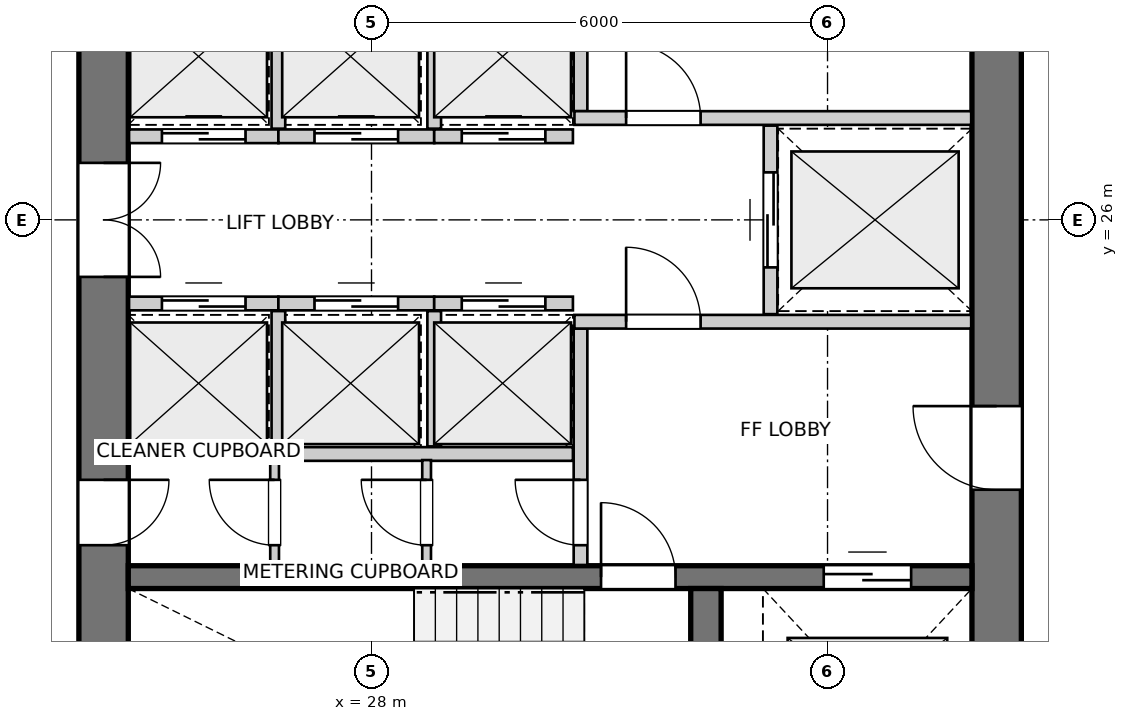
"""IFC4 building model, lengths in metres.
Left out: names, types, materials, properties, quantities, classifications, styles, units other than length and angle.
Written with IfcOpenShell. Run it as: python <this file> out.ifc"""

import sys

from ifc_helpers import new_model, si_unit, direction, frame, frame_2d, origin, place, context, subcontext, project, spatial, rectangle, extrude, source, transform, mapped, element, fill, save


model = new_model("IFC4")
c1 = context("Model", 3, precision=1e-05, world=origin(), true_north=direction((0.0, 1.0)))
c2 = subcontext(c1, "Body", "Model", "MODEL_VIEW")
j1 = project(units=[si_unit("LENGTHUNIT", "METRE"), si_unit("PLANEANGLEUNIT", "RADIAN")], contexts=[c1])
p1 = place(None, origin())
s1 = spatial("IfcSite", under=j1, at=p1, CompositionType="ELEMENT")
p2 = place(p1, origin())
s2 = spatial("IfcBuilding", under=s1, at=p2, CompositionType="ELEMENT")
p3 = place(p2, frame((0.0, 0.0, 124.8)))
s3 = spatial("IfcBuildingStorey", under=s2, at=p3, CompositionType="ELEMENT", Elevation=124.8)
p4 = place(p3, frame((24.475, 33.8, 0.0), z_axis=(0.0, 0.0, 1.0), x_axis=(0.0, -1.0, 0.0)))
e1 = element("IfcWall", 1, at=p4, inside=s3, PredefinedType="SHEAR", context=c2, shape_type="SweptSolid", body=[
    extrude(rectangle(XDim=15.6, YDim=0.65, at=frame_2d((7.8, 0.0))), origin(), (0.0, 0.0, 1.0), 2.9),
])
p5 = place(p4, frame((7.05, 0.0, 0.0)))
e2 = element("IfcOpeningElement", 2, at=p5, cuts=e1, PredefinedType="OPENING", context=c2, shape_type="SweptSolid", body=[
    extrude(rectangle(XDim=1.5, YDim=2.15, at=frame_2d((0.75, 1.075))), frame((0.0, 0.335, 0.0), z_axis=(0.0, -1.0, 0.0), x_axis=(1.0, 0.0, 0.0)), (0.0, 0.0, 1.0), 0.67),
])
p6 = place(p4, frame((3.52, 0.0, 0.0)))
e3 = element("IfcOpeningElement", 3, at=p6, cuts=e1, PredefinedType="OPENING", context=c2, shape_type="SweptSolid", body=[
    extrude(rectangle(XDim=0.86, YDim=2.05, at=frame_2d((0.43, 1.025))), frame((0.0, 0.335, 0.0), z_axis=(0.0, -1.0, 0.0), x_axis=(1.0, 0.0, 0.0)), (0.0, 0.0, 1.0), 0.67),
])
p7 = place(p4, frame((11.22, 0.0, 0.0)))
e4 = element("IfcOpeningElement", 4, at=p7, cuts=e1, PredefinedType="OPENING", context=c2, shape_type="SweptSolid", body=[
    extrude(rectangle(XDim=0.86, YDim=2.05, at=frame_2d((0.43, 1.025))), frame((0.0, 0.335, 0.0), z_axis=(0.0, -1.0, 0.0), x_axis=(1.0, 0.0, 0.0)), (0.0, 0.0, 1.0), 0.67),
])
p8 = place(p3, frame((36.225, 18.2, 0.0), z_axis=(0.0, 0.0, 1.0), x_axis=(0.0, 1.0, 0.0)))
e5 = element("IfcWall", 5, at=p8, inside=s3, PredefinedType="SHEAR", context=c2, shape_type="SweptSolid", body=[
    extrude(rectangle(XDim=15.6, YDim=0.65, at=frame_2d((7.8, 0.0))), origin(), (0.0, 0.0, 1.0), 2.9),
])
p9 = place(p8, frame((4.25, 0.0, 0.0)))
e6 = element("IfcOpeningElement", 6, at=p9, cuts=e5, PredefinedType="OPENING", context=c2, shape_type="SweptSolid", body=[
    extrude(rectangle(XDim=1.1, YDim=2.15, at=frame_2d((0.55, 1.075))), frame((0.0, 0.335, 0.0), z_axis=(0.0, -1.0, 0.0), x_axis=(1.0, 0.0, 0.0)), (0.0, 0.0, 1.0), 0.67),
])
p10 = place(p8, frame((10.25, 0.0, 0.0)))
e7 = element("IfcOpeningElement", 7, at=p10, cuts=e5, PredefinedType="OPENING", context=c2, shape_type="SweptSolid", body=[
    extrude(rectangle(XDim=1.1, YDim=2.15, at=frame_2d((0.55, 1.075))), frame((0.0, 0.335, 0.0), z_axis=(0.0, -1.0, 0.0), x_axis=(1.0, 0.0, 0.0)), (0.0, 0.0, 1.0), 0.67),
])
p11 = place(p3, frame((24.8, 21.3, 0.0), z_axis=(0.0, 0.0, 1.0), x_axis=(1.0, 0.0, 0.0)))
e8 = element("IfcWall", 8, at=p11, inside=s3, PredefinedType="SHEAR", context=c2, shape_type="SweptSolid", body=[
    extrude(rectangle(XDim=11.1, YDim=0.3, at=frame_2d((5.55, 0.0))), origin(), (0.0, 0.0, 1.0), 2.9),
])
p12 = place(p11, frame((6.22, 0.0, 0.0)))
e9 = element("IfcOpeningElement", 9, at=p12, cuts=e8, PredefinedType="OPENING", context=c2, shape_type="SweptSolid", body=[
    extrude(rectangle(XDim=0.98, YDim=2.15, at=frame_2d((0.49, 1.075))), frame((0.0, 0.16, 0.0), z_axis=(0.0, -1.0, 0.0), x_axis=(1.0, 0.0, 0.0)), (0.0, 0.0, 1.0), 0.32),
])
p13 = place(p11, frame((9.15, 0.0, 0.0)))
e10 = element("IfcOpeningElement", 10, at=p13, cuts=e8, PredefinedType="OPENING", context=c2, shape_type="SweptSolid", body=[
    extrude(rectangle(XDim=1.15, YDim=2.15, at=frame_2d((0.575, 1.075))), frame((0.0, 0.16, 0.0), z_axis=(0.0, -1.0, 0.0), x_axis=(1.0, 0.0, 0.0)), (0.0, 0.0, 1.0), 0.32),
])
p14 = place(p3, frame((32.4, 18.2, 0.0), z_axis=(0.0, 0.0, 1.0), x_axis=(0.0, 1.0, 0.0)))
e11 = element("IfcWall", 11, at=p14, inside=s3, PredefinedType="SHEAR", context=c2, shape_type="SweptSolid", body=[
    extrude(rectangle(XDim=2.95, YDim=0.4, at=frame_2d((1.475, 0.0))), origin(), (0.0, 0.0, 1.0), 2.9),
])
p15 = place(p3, frame((30.75, 21.46, 0.0), z_axis=(0.0, 0.0, 1.0), x_axis=(0.0, 1.0, 0.0)))
e12 = element("IfcWall", 12, at=p15, inside=s3, PredefinedType="PARTITIONING", context=c2, shape_type="SweptSolid", body=[
    extrude(rectangle(XDim=3.11, YDim=0.18, at=frame_2d((1.555, 0.0))), origin(), (0.0, 0.0, 1.0), 2.9),
])
p16 = place(p15, frame((0.26, 0.0, 0.0)))
e13 = element("IfcOpeningElement", 13, at=p16, cuts=e12, PredefinedType="OPENING", context=c2, shape_type="SweptSolid", body=[
    extrude(rectangle(XDim=0.86, YDim=2.05, at=frame_2d((0.43, 1.025))), frame((0.0, 0.1, 0.0), z_axis=(0.0, -1.0, 0.0), x_axis=(1.0, 0.0, 0.0)), (0.0, 0.0, 1.0), 0.2),
])
p17 = place(p3, frame((30.67, 24.66, 0.0), z_axis=(0.0, 0.0, 1.0), x_axis=(1.0, 0.0, 0.0)))
e14 = element("IfcWall", 14, at=p17, inside=s3, PredefinedType="PARTITIONING", context=c2, shape_type="SweptSolid", body=[
    extrude(rectangle(XDim=5.22, YDim=0.18, at=frame_2d((2.61, 0.0))), origin(), (0.0, 0.0, 1.0), 2.9),
])
p18 = place(p17, frame((0.68, 0.0, 0.0)))
e15 = element("IfcOpeningElement", 15, at=p18, cuts=e14, PredefinedType="OPENING", context=c2, shape_type="SweptSolid", body=[
    extrude(rectangle(XDim=0.98, YDim=2.15, at=frame_2d((0.49, 1.075))), frame((0.0, 0.1, 0.0), z_axis=(0.0, -1.0, 0.0), x_axis=(1.0, 0.0, 0.0)), (0.0, 0.0, 1.0), 0.2),
])
p19 = place(p3, frame((30.75, 27.43, 0.0), z_axis=(0.0, 0.0, 1.0), x_axis=(0.0, 1.0, 0.0)))
e16 = element("IfcWall", 16, at=p19, inside=s3, PredefinedType="PARTITIONING", context=c2, shape_type="SweptSolid", body=[
    extrude(rectangle(XDim=3.11, YDim=0.18, at=frame_2d((1.555, 0.0))), origin(), (0.0, 0.0, 1.0), 2.9),
])
p20 = place(p19, frame((1.98, 0.0, 0.0)))
e17 = element("IfcOpeningElement", 17, at=p20, cuts=e16, PredefinedType="OPENING", context=c2, shape_type="SweptSolid", body=[
    extrude(rectangle(XDim=0.86, YDim=2.05, at=frame_2d((0.43, 1.025))), frame((0.0, 0.1, 0.0), z_axis=(0.0, -1.0, 0.0), x_axis=(1.0, 0.0, 0.0)), (0.0, 0.0, 1.0), 0.2),
])
p21 = place(p3, frame((30.67, 27.34, 0.0), z_axis=(0.0, 0.0, 1.0), x_axis=(1.0, 0.0, 0.0)))
e18 = element("IfcWall", 18, at=p21, inside=s3, PredefinedType="PARTITIONING", context=c2, shape_type="SweptSolid", body=[
    extrude(rectangle(XDim=5.22, YDim=0.18, at=frame_2d((2.61, 0.0))), origin(), (0.0, 0.0, 1.0), 2.9),
])
p22 = place(p21, frame((0.68, 0.0, 0.0)))
e19 = element("IfcOpeningElement", 19, at=p22, cuts=e18, PredefinedType="OPENING", context=c2, shape_type="SweptSolid", body=[
    extrude(rectangle(XDim=0.98, YDim=2.15, at=frame_2d((0.49, 1.075))), frame((0.0, 0.1, 0.0), z_axis=(0.0, -1.0, 0.0), x_axis=(1.0, 0.0, 0.0)), (0.0, 0.0, 1.0), 0.2),
])
p23 = place(p3, frame((33.25, 24.76, 0.0), z_axis=(0.0, 0.0, 1.0), x_axis=(0.0, 1.0, 0.0)))
e20 = element("IfcWall", 20, at=p23, inside=s3, PredefinedType="PARTITIONING", context=c2, shape_type="SweptSolid", body=[
    extrude(rectangle(XDim=2.48, YDim=0.18, at=frame_2d((1.24, 0.0))), origin(), (0.0, 0.0, 1.0), 2.9),
])
p24 = place(p23, frame((0.615, 0.0, 0.0)))
e21 = element("IfcOpeningElement", 21, at=p24, cuts=e20, PredefinedType="OPENING", context=c2, shape_type="SweptSolid", body=[
    extrude(rectangle(XDim=1.25, YDim=2.15, at=frame_2d((0.625, 1.075))), frame((0.0, 0.1, 0.0), z_axis=(0.0, -1.0, 0.0), x_axis=(1.0, 0.0, 0.0)), (0.0, 0.0, 1.0), 0.2),
])
p25 = place(p3, frame((24.81, 22.92, 0.0), z_axis=(0.0, 0.0, 1.0), x_axis=(1.0, 0.0, 0.0)))
e22 = element("IfcWall", 22, at=p25, inside=s3, PredefinedType="PARTITIONING", context=c2, shape_type="SweptSolid", body=[
    extrude(rectangle(XDim=5.84, YDim=0.18, at=frame_2d((2.92, 0.0))), origin(), (0.0, 0.0, 1.0), 2.9),
])
p26 = place(p3, frame((24.81, 24.9, 0.0), z_axis=(0.0, 0.0, 1.0), x_axis=(1.0, 0.0, 0.0)))
e23 = element("IfcWall", 23, at=p26, inside=s3, PredefinedType="PARTITIONING", context=c2, shape_type="SweptSolid", body=[
    extrude(rectangle(XDim=1.965, YDim=0.18, at=frame_2d((0.982, 0.0))), origin(), (0.0, 0.0, 1.0), 2.9),
])
p27 = place(p26, frame((0.433, 0.0, 0.0)))
e24 = element("IfcOpeningElement", 24, at=p27, cuts=e23, PredefinedType="OPENING", context=c2, shape_type="SweptSolid", body=[
    extrude(rectangle(XDim=1.1, YDim=2.15, at=frame_2d((0.55, 1.075))), frame((0.0, 0.1, 0.0), z_axis=(0.0, -1.0, 0.0), x_axis=(1.0, 0.0, 0.0)), (0.0, 0.0, 1.0), 0.2),
])
p28 = place(p3, frame((26.775, 24.9, 0.0), z_axis=(0.0, 0.0, 1.0), x_axis=(1.0, 0.0, 0.0)))
e25 = element("IfcWall", 25, at=p28, inside=s3, PredefinedType="PARTITIONING", context=c2, shape_type="SweptSolid", body=[
    extrude(rectangle(XDim=2.05, YDim=0.18, at=frame_2d((1.025, 0.0))), origin(), (0.0, 0.0, 1.0), 2.9),
])
p29 = place(p28, frame((0.475, 0.0, 0.0)))
e26 = element("IfcOpeningElement", 26, at=p29, cuts=e25, PredefinedType="OPENING", context=c2, shape_type="SweptSolid", body=[
    extrude(rectangle(XDim=1.1, YDim=2.15, at=frame_2d((0.55, 1.075))), frame((0.0, 0.1, 0.0), z_axis=(0.0, -1.0, 0.0), x_axis=(1.0, 0.0, 0.0)), (0.0, 0.0, 1.0), 0.2),
])
p30 = place(p3, frame((26.775, 23.02, 0.0), z_axis=(0.0, 0.0, 1.0), x_axis=(0.0, 1.0, 0.0)))
e27 = element("IfcWall", 27, at=p30, inside=s3, PredefinedType="PARTITIONING", context=c2, shape_type="SweptSolid", body=[
    extrude(rectangle(XDim=1.78, YDim=0.18, at=frame_2d((0.89, 0.0))), origin(), (0.0, 0.0, 1.0), 2.9),
])
p31 = place(p3, frame((28.825, 24.9, 0.0), z_axis=(0.0, 0.0, 1.0), x_axis=(1.0, 0.0, 0.0)))
e28 = element("IfcWall", 28, at=p31, inside=s3, PredefinedType="PARTITIONING", context=c2, shape_type="SweptSolid", body=[
    extrude(rectangle(XDim=1.825, YDim=0.18, at=frame_2d((0.913, 0.0))), origin(), (0.0, 0.0, 1.0), 2.9),
])
p32 = place(p31, frame((0.363, 0.0, 0.0)))
e29 = element("IfcOpeningElement", 29, at=p32, cuts=e28, PredefinedType="OPENING", context=c2, shape_type="SweptSolid", body=[
    extrude(rectangle(XDim=1.1, YDim=2.15, at=frame_2d((0.55, 1.075))), frame((0.0, 0.1, 0.0), z_axis=(0.0, -1.0, 0.0), x_axis=(1.0, 0.0, 0.0)), (0.0, 0.0, 1.0), 0.2),
])
p33 = place(p3, frame((28.825, 23.02, 0.0), z_axis=(0.0, 0.0, 1.0), x_axis=(0.0, 1.0, 0.0)))
e30 = element("IfcWall", 30, at=p33, inside=s3, PredefinedType="PARTITIONING", context=c2, shape_type="SweptSolid", body=[
    extrude(rectangle(XDim=1.78, YDim=0.18, at=frame_2d((0.89, 0.0))), origin(), (0.0, 0.0, 1.0), 2.9),
])
p34 = place(p3, frame((24.81, 27.1, 0.0), z_axis=(0.0, 0.0, 1.0), x_axis=(1.0, 0.0, 0.0)))
e31 = element("IfcWall", 31, at=p34, inside=s3, PredefinedType="PARTITIONING", context=c2, shape_type="SweptSolid", body=[
    extrude(rectangle(XDim=1.965, YDim=0.18, at=frame_2d((0.982, 0.0))), origin(), (0.0, 0.0, 1.0), 2.9),
])
p35 = place(p34, frame((0.433, 0.0, 0.0)))
e32 = element("IfcOpeningElement", 32, at=p35, cuts=e31, PredefinedType="OPENING", context=c2, shape_type="SweptSolid", body=[
    extrude(rectangle(XDim=1.1, YDim=2.15, at=frame_2d((0.55, 1.075))), frame((0.0, 0.1, 0.0), z_axis=(0.0, -1.0, 0.0), x_axis=(1.0, 0.0, 0.0)), (0.0, 0.0, 1.0), 0.2),
])
p36 = place(p3, frame((26.775, 27.1, 0.0), z_axis=(0.0, 0.0, 1.0), x_axis=(1.0, 0.0, 0.0)))
e33 = element("IfcWall", 33, at=p36, inside=s3, PredefinedType="PARTITIONING", context=c2, shape_type="SweptSolid", body=[
    extrude(rectangle(XDim=2.05, YDim=0.18, at=frame_2d((1.025, 0.0))), origin(), (0.0, 0.0, 1.0), 2.9),
])
p37 = place(p36, frame((0.475, 0.0, 0.0)))
e34 = element("IfcOpeningElement", 34, at=p37, cuts=e33, PredefinedType="OPENING", context=c2, shape_type="SweptSolid", body=[
    extrude(rectangle(XDim=1.1, YDim=2.15, at=frame_2d((0.55, 1.075))), frame((0.0, 0.1, 0.0), z_axis=(0.0, -1.0, 0.0), x_axis=(1.0, 0.0, 0.0)), (0.0, 0.0, 1.0), 0.2),
])
p38 = place(p3, frame((26.775, 27.2, 0.0), z_axis=(0.0, 0.0, 1.0), x_axis=(0.0, 1.0, 0.0)))
e35 = element("IfcWall", 35, at=p38, inside=s3, PredefinedType="PARTITIONING", context=c2, shape_type="SweptSolid", body=[
    extrude(rectangle(XDim=1.78, YDim=0.18, at=frame_2d((0.89, 0.0))), origin(), (0.0, 0.0, 1.0), 2.9),
])
p39 = place(p3, frame((28.825, 27.1, 0.0), z_axis=(0.0, 0.0, 1.0), x_axis=(1.0, 0.0, 0.0)))
e36 = element("IfcWall", 36, at=p39, inside=s3, PredefinedType="PARTITIONING", context=c2, shape_type="SweptSolid", body=[
    extrude(rectangle(XDim=1.825, YDim=0.18, at=frame_2d((0.913, 0.0))), origin(), (0.0, 0.0, 1.0), 2.9),
])
p40 = place(p39, frame((0.363, 0.0, 0.0)))
e37 = element("IfcOpeningElement", 37, at=p40, cuts=e36, PredefinedType="OPENING", context=c2, shape_type="SweptSolid", body=[
    extrude(rectangle(XDim=1.1, YDim=2.15, at=frame_2d((0.55, 1.075))), frame((0.0, 0.1, 0.0), z_axis=(0.0, -1.0, 0.0), x_axis=(1.0, 0.0, 0.0)), (0.0, 0.0, 1.0), 0.2),
])
p41 = place(p3, frame((28.825, 27.2, 0.0), z_axis=(0.0, 0.0, 1.0), x_axis=(0.0, 1.0, 0.0)))
e38 = element("IfcWall", 38, at=p41, inside=s3, PredefinedType="PARTITIONING", context=c2, shape_type="SweptSolid", body=[
    extrude(rectangle(XDim=1.78, YDim=0.18, at=frame_2d((0.89, 0.0))), origin(), (0.0, 0.0, 1.0), 2.9),
])
p42 = place(p3, frame((26.725, 21.46, 0.0), z_axis=(0.0, 0.0, 1.0), x_axis=(0.0, 1.0, 0.0)))
e39 = element("IfcWall", 39, at=p42, inside=s3, PredefinedType="PARTITIONING", context=c2, shape_type="SweptSolid", body=[
    extrude(rectangle(XDim=1.38, YDim=0.115, at=frame_2d((0.69, 0.0))), origin(), (0.0, 0.0, 1.0), 2.9),
])
p43 = place(p42, frame((0.26, 0.0, 0.0)))
e40 = element("IfcOpeningElement", 40, at=p43, cuts=e39, PredefinedType="OPENING", context=c2, shape_type="SweptSolid", body=[
    extrude(rectangle(XDim=0.86, YDim=2.05, at=frame_2d((0.43, 1.025))), frame((0.0, 0.067, 0.0), z_axis=(0.0, -1.0, 0.0), x_axis=(1.0, 0.0, 0.0)), (0.0, 0.0, 1.0), 0.135),
])
p44 = place(p3, frame((28.725, 21.46, 0.0), z_axis=(0.0, 0.0, 1.0), x_axis=(0.0, 1.0, 0.0)))
e41 = element("IfcWall", 41, at=p44, inside=s3, PredefinedType="PARTITIONING", context=c2, shape_type="SweptSolid", body=[
    extrude(rectangle(XDim=1.38, YDim=0.115, at=frame_2d((0.69, 0.0))), origin(), (0.0, 0.0, 1.0), 2.9),
])
p45 = place(p44, frame((0.26, 0.0, 0.0)))
e42 = element("IfcOpeningElement", 42, at=p45, cuts=e41, PredefinedType="OPENING", context=c2, shape_type="SweptSolid", body=[
    extrude(rectangle(XDim=0.86, YDim=2.05, at=frame_2d((0.43, 1.025))), frame((0.0, 0.067, 0.0), z_axis=(0.0, -1.0, 0.0), x_axis=(1.0, 0.0, 0.0)), (0.0, 0.0, 1.0), 0.135),
])
m1 = source(origin(), c2, "Body", "SweptSolid", [
    extrude(rectangle(XDim=0.98, YDim=2.15, at=frame_2d((0.49, 1.075))), frame((0.0, 0.025, 0.0), z_axis=(0.0, -1.0, 0.0), x_axis=(1.0, 0.0, 0.0)), (0.0, 0.0, 1.0), 0.05),
])
p46 = place(p12, origin())
e43 = element("IfcDoor", 43, at=p46, inside=s3, OperationType="SINGLE_SWING_LEFT", PredefinedType="DOOR", context=c2, shape_type="MappedRepresentation", body=[
    mapped(m1, transform((0.0, 0.0, 0.0), x_axis=(1.0, 0.0, 0.0), y_axis=(0.0, 1.0, 0.0), z_axis=(0.0, 0.0, 1.0), scale=1.0)),
])
fill(e9, e43)
m2 = source(origin(), c2, "Body", "SweptSolid", [
    extrude(rectangle(XDim=1.15, YDim=2.15, at=frame_2d((0.575, 1.075))), frame((0.0, 0.025, 0.0), z_axis=(0.0, -1.0, 0.0), x_axis=(1.0, 0.0, 0.0)), (0.0, 0.0, 1.0), 0.05),
])
p47 = place(p13, origin())
e44 = element("IfcDoor", 44, at=p47, inside=s3, OperationType="DOUBLE_DOOR_SLIDING", PredefinedType="DOOR", context=c2, shape_type="MappedRepresentation", body=[
    mapped(m2, transform((0.0, 0.0, 0.0), x_axis=(1.0, 0.0, 0.0), y_axis=(0.0, 1.0, 0.0), z_axis=(0.0, 0.0, 1.0), scale=1.0)),
])
fill(e10, e44)
m3 = source(origin(), c2, "Body", "SweptSolid", [
    extrude(rectangle(XDim=1.1, YDim=2.15, at=frame_2d((0.55, 1.075))), frame((0.0, 0.025, 0.0), z_axis=(0.0, -1.0, 0.0), x_axis=(1.0, 0.0, 0.0)), (0.0, 0.0, 1.0), 0.05),
])
p48 = place(p9, origin())
e45 = element("IfcDoor", 45, at=p48, inside=s3, OperationType="SINGLE_SWING_RIGHT", PredefinedType="DOOR", context=c2, shape_type="MappedRepresentation", body=[
    mapped(m3, transform((0.0, 0.0, 0.0), x_axis=(1.0, 0.0, 0.0), y_axis=(0.0, 1.0, 0.0), z_axis=(0.0, 0.0, 1.0), scale=1.0)),
])
fill(e6, e45)
m4 = source(origin(), c2, "Body", "SweptSolid", [
    extrude(rectangle(XDim=1.5, YDim=2.15, at=frame_2d((0.75, 1.075))), frame((0.0, 0.025, 0.0), z_axis=(0.0, -1.0, 0.0), x_axis=(1.0, 0.0, 0.0)), (0.0, 0.0, 1.0), 0.05),
])
p49 = place(p5, origin())
e46 = element("IfcDoor", 46, at=p49, inside=s3, OperationType="DOUBLE_DOOR_SINGLE_SWING", PredefinedType="DOOR", context=c2, shape_type="MappedRepresentation", body=[
    mapped(m4, transform((0.0, 0.0, 0.0), x_axis=(1.0, 0.0, 0.0), y_axis=(0.0, 1.0, 0.0), z_axis=(0.0, 0.0, 1.0), scale=1.0)),
])
fill(e2, e46)
m5 = source(origin(), c2, "Body", "SweptSolid", [
    extrude(rectangle(XDim=0.86, YDim=2.05, at=frame_2d((0.43, 1.025))), frame((0.0, 0.025, 0.0), z_axis=(0.0, -1.0, 0.0), x_axis=(1.0, 0.0, 0.0)), (0.0, 0.0, 1.0), 0.05),
])
p50 = place(p7, origin())
e47 = element("IfcDoor", 47, at=p50, inside=s3, OperationType="SINGLE_SWING_LEFT", PredefinedType="DOOR", context=c2, shape_type="MappedRepresentation", body=[
    mapped(m5, transform((0.0, 0.0, 0.0), x_axis=(1.0, 0.0, 0.0), y_axis=(0.0, 1.0, 0.0), z_axis=(0.0, 0.0, 1.0), scale=1.0)),
])
fill(e4, e47)
p51 = place(p16, origin())
e48 = element("IfcDoor", 48, at=p51, inside=s3, OperationType="SINGLE_SWING_RIGHT", PredefinedType="DOOR", context=c2, shape_type="MappedRepresentation", body=[
    mapped(m5, transform((0.0, 0.0, 0.0), x_axis=(1.0, 0.0, 0.0), y_axis=(0.0, 1.0, 0.0), z_axis=(0.0, 0.0, 1.0), scale=1.0)),
])
fill(e13, e48)
p52 = place(p18, origin())
e49 = element("IfcDoor", 49, at=p52, inside=s3, OperationType="SINGLE_SWING_LEFT", PredefinedType="DOOR", context=c2, shape_type="MappedRepresentation", body=[
    mapped(m1, transform((0.0, 0.0, 0.0), x_axis=(1.0, 0.0, 0.0), y_axis=(0.0, 1.0, 0.0), z_axis=(0.0, 0.0, 1.0), scale=1.0)),
])
fill(e15, e49)
p53 = place(p22, origin())
e50 = element("IfcDoor", 50, at=p53, inside=s3, OperationType="SINGLE_SWING_LEFT", PredefinedType="DOOR", context=c2, shape_type="MappedRepresentation", body=[
    mapped(m1, transform((0.0, 0.0, 0.0), x_axis=(1.0, 0.0, 0.0), y_axis=(0.0, 1.0, 0.0), z_axis=(0.0, 0.0, 1.0), scale=1.0)),
])
fill(e19, e50)
m6 = source(origin(), c2, "Body", "SweptSolid", [
    extrude(rectangle(XDim=1.25, YDim=2.15, at=frame_2d((0.625, 1.075))), frame((0.0, 0.025, 0.0), z_axis=(0.0, -1.0, 0.0), x_axis=(1.0, 0.0, 0.0)), (0.0, 0.0, 1.0), 0.05),
])
p54 = place(p24, origin())
e51 = element("IfcDoor", 51, at=p54, inside=s3, OperationType="DOUBLE_DOOR_SLIDING", PredefinedType="DOOR", context=c2, shape_type="MappedRepresentation", body=[
    mapped(m6, transform((0.0, 0.0, 0.0), x_axis=(1.0, 0.0, 0.0), y_axis=(0.0, 1.0, 0.0), z_axis=(0.0, 0.0, 1.0), scale=1.0)),
])
fill(e21, e51)
p55 = place(p27, origin())
e52 = element("IfcDoor", 52, at=p55, inside=s3, OperationType="DOUBLE_DOOR_SLIDING", PredefinedType="DOOR", context=c2, shape_type="MappedRepresentation", body=[
    mapped(m3, transform((0.0, 0.0, 0.0), x_axis=(1.0, 0.0, 0.0), y_axis=(0.0, 1.0, 0.0), z_axis=(0.0, 0.0, 1.0), scale=1.0)),
])
fill(e24, e52)
p56 = place(p29, origin())
e53 = element("IfcDoor", 53, at=p56, inside=s3, OperationType="DOUBLE_DOOR_SLIDING", PredefinedType="DOOR", context=c2, shape_type="MappedRepresentation", body=[
    mapped(m3, transform((0.0, 0.0, 0.0), x_axis=(1.0, 0.0, 0.0), y_axis=(0.0, 1.0, 0.0), z_axis=(0.0, 0.0, 1.0), scale=1.0)),
])
fill(e26, e53)
p57 = place(p32, origin())
e54 = element("IfcDoor", 54, at=p57, inside=s3, OperationType="DOUBLE_DOOR_SLIDING", PredefinedType="DOOR", context=c2, shape_type="MappedRepresentation", body=[
    mapped(m3, transform((0.0, 0.0, 0.0), x_axis=(1.0, 0.0, 0.0), y_axis=(0.0, 1.0, 0.0), z_axis=(0.0, 0.0, 1.0), scale=1.0)),
])
fill(e29, e54)
p58 = place(p35, origin())
e55 = element("IfcDoor", 55, at=p58, inside=s3, OperationType="DOUBLE_DOOR_SLIDING", PredefinedType="DOOR", context=c2, shape_type="MappedRepresentation", body=[
    mapped(m3, transform((0.0, 0.0, 0.0), x_axis=(1.0, 0.0, 0.0), y_axis=(0.0, 1.0, 0.0), z_axis=(0.0, 0.0, 1.0), scale=1.0)),
])
fill(e32, e55)
p59 = place(p37, origin())
e56 = element("IfcDoor", 56, at=p59, inside=s3, OperationType="DOUBLE_DOOR_SLIDING", PredefinedType="DOOR", context=c2, shape_type="MappedRepresentation", body=[
    mapped(m3, transform((0.0, 0.0, 0.0), x_axis=(1.0, 0.0, 0.0), y_axis=(0.0, 1.0, 0.0), z_axis=(0.0, 0.0, 1.0), scale=1.0)),
])
fill(e34, e56)
p60 = place(p40, origin())
e57 = element("IfcDoor", 57, at=p60, inside=s3, OperationType="DOUBLE_DOOR_SLIDING", PredefinedType="DOOR", context=c2, shape_type="MappedRepresentation", body=[
    mapped(m3, transform((0.0, 0.0, 0.0), x_axis=(1.0, 0.0, 0.0), y_axis=(0.0, 1.0, 0.0), z_axis=(0.0, 0.0, 1.0), scale=1.0)),
])
fill(e37, e57)
p61 = place(p43, origin())
e58 = element("IfcDoor", 58, at=p61, inside=s3, OperationType="SINGLE_SWING_RIGHT", PredefinedType="DOOR", context=c2, shape_type="MappedRepresentation", body=[
    mapped(m5, transform((0.0, 0.0, 0.0), x_axis=(1.0, 0.0, 0.0), y_axis=(0.0, 1.0, 0.0), z_axis=(0.0, 0.0, 1.0), scale=1.0)),
])
fill(e40, e58)
p62 = place(p45, origin())
e59 = element("IfcDoor", 59, at=p62, inside=s3, OperationType="SINGLE_SWING_RIGHT", PredefinedType="DOOR", context=c2, shape_type="MappedRepresentation", body=[
    mapped(m5, transform((0.0, 0.0, 0.0), x_axis=(1.0, 0.0, 0.0), y_axis=(0.0, 1.0, 0.0), z_axis=(0.0, 0.0, 1.0), scale=1.0)),
])
fill(e42, e59)
save(model, sys.argv[1])
